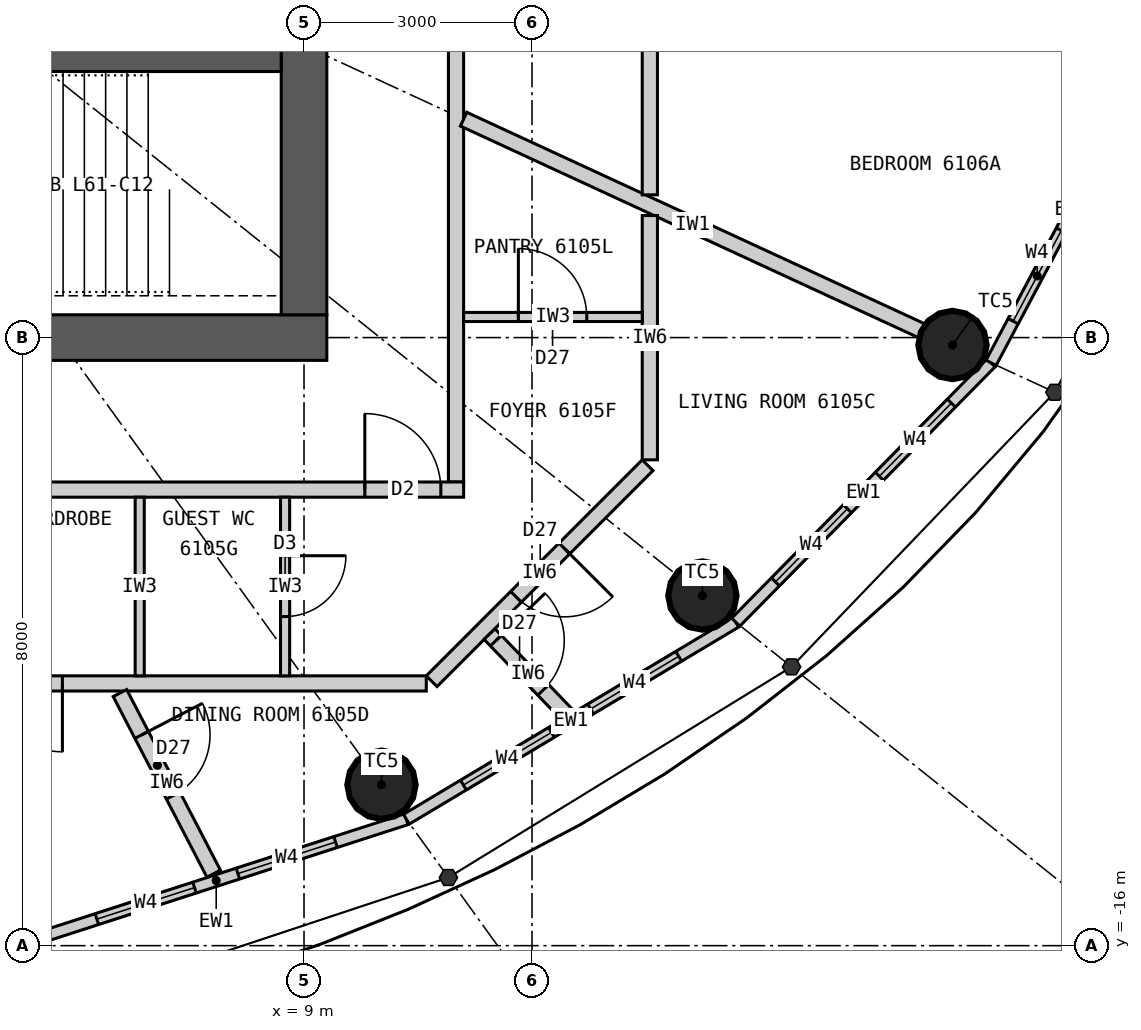
"""IFC4 building model, lengths in metres.
Left out: names, types, materials, properties, quantities, classifications, styles, units other than length and angle.
Written with IfcOpenShell. Run it as: python <this file> out.ifc"""

import sys

from ifc_helpers import new_model, si_unit, direction, frame, frame_2d, origin, origin_2d, place, context, subcontext, project, spatial, rectangle, circle, extrude, element, fill, save


model = new_model("IFC4")
c1 = context("Model", 3, precision=1e-05, world=origin(), true_north=direction((0.0, 1.0)))
c2 = subcontext(c1, "Body", "Model", "MODEL_VIEW")
j1 = project(units=[si_unit("LENGTHUNIT", "METRE"), si_unit("PLANEANGLEUNIT", "RADIAN")], contexts=[c1])
p1 = place(None, origin())
s1 = spatial("IfcSite", under=j1, at=p1, CompositionType="ELEMENT")
p2 = place(p1, origin())
s2 = spatial("IfcBuilding", under=s1, at=p2, CompositionType="ELEMENT")
p3 = place(p2, frame((0.0, 0.0, 225.9)))
s3 = spatial("IfcBuildingStorey", under=s2, at=p3, CompositionType="ELEMENT", Elevation=225.9)
for number, where, z_axis, x_axis in (
    (1, (10.019, -13.883, 0.0), (0.0, 0.0, 1.0), (1.0, 0.0, 0.0)),
    (2, (14.241, -11.393, 0.0), (0.0, 0.0, 1.0), (1.0, 0.0, 0.0)),
    (3, (17.532, -8.098, 0.0), (0.0, 0.0, 1.0), (1.0, 0.0, 0.0)),
):
    element("IfcColumn", number, at=place(p3, frame(where, z_axis=z_axis, x_axis=x_axis)), inside=s3, PredefinedType="COLUMN", context=c2, shape_type="SweptSolid", body=[
        extrude(circle(Radius=0.45, at=origin_2d()), origin(), (0.0, 0.0, 1.0), 3.3),
    ])
p4 = place(p3, frame((9.3, -8.0, 0.0), z_axis=(0.0, 0.0, 1.0), x_axis=(-1.0, 0.0, 0.0)))
e4 = element("IfcWall", 4, at=p4, inside=s3, PredefinedType="SHEAR", context=c2, shape_type="SweptSolid", body=[
    extrude(rectangle(XDim=18.6, YDim=0.6, at=frame_2d((9.3, 0.0))), origin(), (0.0, 0.0, 1.0), 3.3),
])
p5 = place(p4, frame((8.0, 0.0, 0.0)))
e5 = element("IfcOpeningElement", 5, at=p5, cuts=e4, PredefinedType="OPENING", context=c2, shape_type="SweptSolid", body=[
    extrude(rectangle(XDim=1.2, YDim=2.2, at=frame_2d((0.6, 1.1))), frame((0.0, 0.31, 0.0), z_axis=(0.0, -1.0, 0.0), x_axis=(1.0, 0.0, 0.0)), (0.0, 0.0, 1.0), 0.62),
])
p6 = place(p4, frame((15.6, 0.0, 0.0)))
e6 = element("IfcOpeningElement", 6, at=p6, cuts=e4, PredefinedType="OPENING", context=c2, shape_type="SweptSolid", body=[
    extrude(rectangle(XDim=0.9, YDim=2.2, at=frame_2d((0.45, 1.1))), frame((0.0, 0.31, 0.0), z_axis=(0.0, -1.0, 0.0), x_axis=(1.0, 0.0, 0.0)), (0.0, 0.0, 1.0), 0.62),
])
p7 = place(p3, frame((9.0, -7.7, 0.0), z_axis=(0.0, 0.0, 1.0), x_axis=(0.0, 1.0, 0.0)))
e7 = element("IfcWall", 7, at=p7, inside=s3, PredefinedType="SHEAR", context=c2, shape_type="SweptSolid", body=[
    extrude(rectangle(XDim=15.4, YDim=0.6, at=frame_2d((7.7, 0.0))), origin(), (0.0, 0.0, 1.0), 3.3),
])
p8 = place(p7, frame((6.8, 0.0, 0.0)))
e8 = element("IfcOpeningElement", 8, at=p8, cuts=e7, PredefinedType="OPENING", context=c2, shape_type="SweptSolid", body=[
    extrude(rectangle(XDim=1.8, YDim=2.2, at=frame_2d((0.9, 1.1))), frame((0.0, 0.31, 0.0), z_axis=(0.0, -1.0, 0.0), x_axis=(1.0, 0.0, 0.0)), (0.0, 0.0, 1.0), 0.62),
])
p9 = place(p3, frame((-8.7, -4.3, 0.0), z_axis=(0.0, 0.0, 1.0), x_axis=(1.0, 0.0, 0.0)))
e9 = element("IfcWall", 9, at=p9, inside=s3, PredefinedType="SHEAR", context=c2, shape_type="SweptSolid", body=[
    extrude(rectangle(XDim=17.4, YDim=0.4, at=frame_2d((8.7, 0.0))), origin(), (0.0, 0.0, 1.0), 3.3),
])
p10 = place(p3, frame((5.343, -15.952, 0.0), z_axis=(0.0, 0.0, 1.0), x_axis=(0.951644702515, 0.307200846638, 0.0)))
e10 = element("IfcWall", 10, at=p10, inside=s3, PredefinedType="ELEMENTEDWALL", context=c2, shape_type="SweptSolid", body=[
    extrude(rectangle(XDim=5.258, YDim=0.15, at=frame_2d((2.629, 0.0))), origin(), (0.0, 0.0, 1.0), 3.12),
])
p11 = place(p10, frame((0.979, 0.0, 0.9)))
e11 = element("IfcOpeningElement", 11, at=p11, cuts=e10, PredefinedType="OPENING", context=c2, shape_type="SweptSolid", body=[
    extrude(rectangle(XDim=1.35, YDim=1.9, at=frame_2d((0.675, 0.95))), frame((0.0, 0.085, 0.0), z_axis=(0.0, -1.0, 0.0), x_axis=(1.0, 0.0, 0.0)), (0.0, 0.0, 1.0), 0.17),
])
p12 = place(p10, frame((2.929, 0.0, 0.9)))
e12 = element("IfcOpeningElement", 12, at=p12, cuts=e10, PredefinedType="OPENING", context=c2, shape_type="SweptSolid", body=[
    extrude(rectangle(XDim=1.35, YDim=1.9, at=frame_2d((0.675, 0.95))), frame((0.0, 0.085, 0.0), z_axis=(0.0, -1.0, 0.0), x_axis=(1.0, 0.0, 0.0)), (0.0, 0.0, 1.0), 0.17),
])
p13 = place(p3, frame((10.346, -14.336, 0.0), z_axis=(0.0, 0.0, 1.0), x_axis=(0.85822150553, 0.513279502265, 0.0)))
e13 = element("IfcWall", 13, at=p13, inside=s3, PredefinedType="ELEMENTEDWALL", context=c2, shape_type="SweptSolid", body=[
    extrude(rectangle(XDim=5.05, YDim=0.15, at=frame_2d((2.525, 0.0))), origin(), (0.0, 0.0, 1.0), 3.12),
])
p14 = place(p13, frame((0.875, 0.0, 0.9)))
e14 = element("IfcOpeningElement", 14, at=p14, cuts=e13, PredefinedType="OPENING", context=c2, shape_type="SweptSolid", body=[
    extrude(rectangle(XDim=1.35, YDim=1.9, at=frame_2d((0.675, 0.95))), frame((0.0, 0.085, 0.0), z_axis=(0.0, -1.0, 0.0), x_axis=(1.0, 0.0, 0.0)), (0.0, 0.0, 1.0), 0.17),
])
p15 = place(p13, frame((2.825, 0.0, 0.9)))
e15 = element("IfcOpeningElement", 15, at=p15, cuts=e13, PredefinedType="OPENING", context=c2, shape_type="SweptSolid", body=[
    extrude(rectangle(XDim=1.35, YDim=1.9, at=frame_2d((0.675, 0.95))), frame((0.0, 0.085, 0.0), z_axis=(0.0, -1.0, 0.0), x_axis=(1.0, 0.0, 0.0)), (0.0, 0.0, 1.0), 0.17),
])
p16 = place(p3, frame((14.68, -11.744, 0.0), z_axis=(0.0, 0.0, 1.0), x_axis=(0.701527379618, 0.712642501993, 0.0)))
e16 = element("IfcWall", 16, at=p16, inside=s3, PredefinedType="ELEMENTEDWALL", context=c2, shape_type="SweptSolid", body=[
    extrude(rectangle(XDim=4.788, YDim=0.15, at=frame_2d((2.394, 0.0))), origin(), (0.0, 0.0, 1.0), 3.12),
])
p17 = place(p16, frame((0.744, 0.0, 0.9)))
e17 = element("IfcOpeningElement", 17, at=p17, cuts=e16, PredefinedType="OPENING", context=c2, shape_type="SweptSolid", body=[
    extrude(rectangle(XDim=1.35, YDim=1.9, at=frame_2d((0.675, 0.95))), frame((0.0, 0.085, 0.0), z_axis=(0.0, -1.0, 0.0), x_axis=(1.0, 0.0, 0.0)), (0.0, 0.0, 1.0), 0.17),
])
p18 = place(p16, frame((2.694, 0.0, 0.9)))
e18 = element("IfcOpeningElement", 18, at=p18, cuts=e16, PredefinedType="OPENING", context=c2, shape_type="SweptSolid", body=[
    extrude(rectangle(XDim=1.35, YDim=1.9, at=frame_2d((0.675, 0.95))), frame((0.0, 0.085, 0.0), z_axis=(0.0, -1.0, 0.0), x_axis=(1.0, 0.0, 0.0)), (0.0, 0.0, 1.0), 0.17),
])
p19 = place(p3, frame((18.04, -8.332, 0.0), z_axis=(0.0, 0.0, 1.0), x_axis=(0.469256152955, 0.883062094597, 0.0)))
e19 = element("IfcWall", 19, at=p19, inside=s3, PredefinedType="ELEMENTEDWALL", context=c2, shape_type="SweptSolid", body=[
    extrude(rectangle(XDim=4.539, YDim=0.15, at=frame_2d((2.27, 0.0))), origin(), (0.0, 0.0, 1.0), 3.12),
])
p20 = place(p19, frame((0.62, 0.0, 0.9)))
e20 = element("IfcOpeningElement", 20, at=p20, cuts=e19, PredefinedType="OPENING", context=c2, shape_type="SweptSolid", body=[
    extrude(rectangle(XDim=1.35, YDim=1.9, at=frame_2d((0.675, 0.95))), frame((0.0, 0.085, 0.0), z_axis=(0.0, -1.0, 0.0), x_axis=(1.0, 0.0, 0.0)), (0.0, 0.0, 1.0), 0.17),
])
p21 = place(p19, frame((2.57, 0.0, 0.9)))
e21 = element("IfcOpeningElement", 21, at=p21, cuts=e19, PredefinedType="OPENING", context=c2, shape_type="SweptSolid", body=[
    extrude(rectangle(XDim=1.35, YDim=1.9, at=frame_2d((0.675, 0.95))), frame((0.0, 0.085, 0.0), z_axis=(0.0, -1.0, 0.0), x_axis=(1.0, 0.0, 0.0)), (0.0, 0.0, 1.0), 0.17),
])
p22 = place(p3, frame((11.0, -9.9, 0.0), z_axis=(0.0, 0.0, 1.0), x_axis=(0.0, 1.0, 0.0)))
e22 = element("IfcWall", 22, at=p22, inside=s3, PredefinedType="PARTITIONING", context=c2, shape_type="SweptSolid", body=[
    extrude(rectangle(XDim=19.8, YDim=0.2, at=frame_2d((9.9, 0.0))), origin(), (0.0, 0.0, 1.0), 3.12),
])
p23 = place(p22, frame((18.658, 0.0, 0.0)))
e23 = element("IfcOpeningElement", 23, at=p23, cuts=e22, PredefinedType="OPENING", context=c2, shape_type="SweptSolid", body=[
    extrude(rectangle(XDim=1.0, YDim=2.2, at=frame_2d((0.5, 1.1))), frame((0.0, 0.11, 0.0), z_axis=(0.0, -1.0, 0.0), x_axis=(1.0, 0.0, 0.0)), (0.0, 0.0, 1.0), 0.22),
])
p24 = place(p22, frame((9.385, 0.0, 0.0)))
e24 = element("IfcOpeningElement", 24, at=p24, cuts=e22, PredefinedType="OPENING", context=c2, shape_type="SweptSolid", body=[
    extrude(rectangle(XDim=1.0, YDim=2.2, at=frame_2d((0.5, 1.1))), frame((0.0, 0.11, 0.0), z_axis=(0.0, -1.0, 0.0), x_axis=(1.0, 0.0, 0.0)), (0.0, 0.0, 1.0), 0.22),
])
p25 = place(p3, frame((11.1, -10.0, 0.0), z_axis=(0.0, 0.0, 1.0), x_axis=(-1.0, 0.0, 0.0)))
e25 = element("IfcWall", 25, at=p25, inside=s3, PredefinedType="PARTITIONING", context=c2, shape_type="SweptSolid", body=[
    extrude(rectangle(XDim=22.2, YDim=0.2, at=frame_2d((11.1, 0.0))), origin(), (0.0, 0.0, 1.0), 3.12),
])
p26 = place(p25, frame((0.3, 0.0, 0.0)))
e26 = element("IfcOpeningElement", 26, at=p26, cuts=e25, PredefinedType="OPENING", context=c2, shape_type="SweptSolid", body=[
    extrude(rectangle(XDim=1.0, YDim=2.2, at=frame_2d((0.5, 1.1))), frame((0.0, 0.11, 0.0), z_axis=(0.0, -1.0, 0.0), x_axis=(1.0, 0.0, 0.0)), (0.0, 0.0, 1.0), 0.22),
])
p27 = place(p3, frame((11.1, -5.127, 0.0), z_axis=(0.0, 0.0, 1.0), x_axis=(0.907840886552, -0.419314827672, 0.0)))
e27 = element("IfcWall", 27, at=p27, inside=s3, PredefinedType="PARTITIONING", context=c2, shape_type="SweptSolid", body=[
    extrude(rectangle(XDim=6.635, YDim=0.2, at=frame_2d((3.318, 0.0))), origin(), (0.0, 0.0, 1.0), 2.32),
])
p28 = place(p3, frame((0.101, -12.55, 0.0), z_axis=(0.0, 0.0, 1.0), x_axis=(1.0, 0.0, 0.0)))
e28 = element("IfcWall", 28, at=p28, inside=s3, PredefinedType="PARTITIONING", context=c2, shape_type="SweptSolid", body=[
    extrude(rectangle(XDim=10.508, YDim=0.2, at=frame_2d((5.254, 0.0))), origin(), (0.0, 0.0, 1.0), 3.12),
])
p29 = place(p28, frame((2.675, 0.0, 0.0)))
e29 = element("IfcOpeningElement", 29, at=p29, cuts=e28, PredefinedType="OPENING", context=c2, shape_type="SweptSolid", body=[
    extrude(rectangle(XDim=0.8, YDim=2.1, at=frame_2d((0.4, 1.05))), frame((0.0, 0.11, 0.0), z_axis=(0.0, -1.0, 0.0), x_axis=(1.0, 0.0, 0.0)), (0.0, 0.0, 1.0), 0.22),
])
p30 = place(p28, frame((4.82, 0.0, 0.0)))
e30 = element("IfcOpeningElement", 30, at=p30, cuts=e28, PredefinedType="OPENING", context=c2, shape_type="SweptSolid", body=[
    extrude(rectangle(XDim=0.9, YDim=2.1, at=frame_2d((0.45, 1.05))), frame((0.0, 0.11, 0.0), z_axis=(0.0, -1.0, 0.0), x_axis=(1.0, 0.0, 0.0)), (0.0, 0.0, 1.0), 0.22),
])
p31 = place(p3, frame((10.679, -12.521, 0.0), z_axis=(0.0, 0.0, 1.0), x_axis=(0.707106781187, 0.707106781187, 0.0)))
e31 = element("IfcWall", 31, at=p31, inside=s3, PredefinedType="PARTITIONING", context=c2, shape_type="SweptSolid", body=[
    extrude(rectangle(XDim=4.019, YDim=0.2, at=frame_2d((2.009, 0.0))), origin(), (0.0, 0.0, 1.0), 3.12),
])
p32 = place(p31, frame((1.57, 0.0, 0.0)))
e32 = element("IfcOpeningElement", 32, at=p32, cuts=e31, PredefinedType="OPENING", context=c2, shape_type="SweptSolid", body=[
    extrude(rectangle(XDim=0.9, YDim=2.1, at=frame_2d((0.45, 1.05))), frame((0.0, 0.11, 0.0), z_axis=(0.0, -1.0, 0.0), x_axis=(1.0, 0.0, 0.0)), (0.0, 0.0, 1.0), 0.22),
])
p33 = place(p3, frame((13.55, -9.609, 0.0), z_axis=(0.0, 0.0, 1.0), x_axis=(0.0, 1.0, 0.0)))
e33 = element("IfcWall", 33, at=p33, inside=s3, PredefinedType="PARTITIONING", context=c2, shape_type="SweptSolid", body=[
    extrude(rectangle(XDim=3.214, YDim=0.2, at=frame_2d((1.607, 0.0))), origin(), (0.0, 0.0, 1.0), 3.12),
])
p34 = place(p3, frame((6.578, -12.677, 0.0), z_axis=(0.0, 0.0, 1.0), x_axis=(0.460620531465, -0.887597164255, 0.0)))
e34 = element("IfcWall", 34, at=p34, inside=s3, PredefinedType="PARTITIONING", context=c2, shape_type="SweptSolid", body=[
    extrude(rectangle(XDim=2.678, YDim=0.2, at=frame_2d((1.339, 0.0))), origin(), (0.0, 0.0, 1.0), 3.12),
])
p35 = place(p34, frame((0.62, 0.0, 0.0)))
e35 = element("IfcOpeningElement", 35, at=p35, cuts=e34, PredefinedType="OPENING", context=c2, shape_type="SweptSolid", body=[
    extrude(rectangle(XDim=0.9, YDim=2.1, at=frame_2d((0.45, 1.05))), frame((0.0, 0.11, 0.0), z_axis=(0.0, -1.0, 0.0), x_axis=(1.0, 0.0, 0.0)), (0.0, 0.0, 1.0), 0.22),
])
p36 = place(p3, frame((11.441, -11.9, 0.0), z_axis=(0.0, 0.0, 1.0), x_axis=(0.692958717259, -0.720977264672, 0.0)))
e36 = element("IfcWall", 36, at=p36, inside=s3, PredefinedType="PARTITIONING", context=c2, shape_type="SweptSolid", body=[
    extrude(rectangle(XDim=1.464, YDim=0.2, at=frame_2d((0.732, 0.0))), origin(), (0.0, 0.0, 1.0), 3.12),
])
p37 = place(p36, frame((0.12, 0.0, 0.0)))
e37 = element("IfcOpeningElement", 37, at=p37, cuts=e36, PredefinedType="OPENING", context=c2, shape_type="SweptSolid", body=[
    extrude(rectangle(XDim=0.9, YDim=2.1, at=frame_2d((0.45, 1.05))), frame((0.0, 0.11, 0.0), z_axis=(0.0, -1.0, 0.0), x_axis=(1.0, 0.0, 0.0)), (0.0, 0.0, 1.0), 0.22),
])
p38 = place(p3, frame((6.838, -10.1, 0.0), z_axis=(0.0, 0.0, 1.0), x_axis=(0.0, -1.0, 0.0)))
e38 = element("IfcWall", 38, at=p38, inside=s3, PredefinedType="PARTITIONING", context=c2, shape_type="SweptSolid", body=[
    extrude(rectangle(XDim=2.35, YDim=0.12, at=frame_2d((1.175, 0.0))), origin(), (0.0, 0.0, 1.0), 3.12),
])
p39 = place(p3, frame((8.751, -10.1, 0.0), z_axis=(0.0, 0.0, 1.0), x_axis=(0.0, -1.0, 0.0)))
e39 = element("IfcWall", 39, at=p39, inside=s3, PredefinedType="PARTITIONING", context=c2, shape_type="SweptSolid", body=[
    extrude(rectangle(XDim=2.35, YDim=0.12, at=frame_2d((1.175, 0.0))), origin(), (0.0, 0.0, 1.0), 3.12),
])
p40 = place(p39, frame((0.77, 0.0, 0.0)))
e40 = element("IfcOpeningElement", 40, at=p40, cuts=e39, PredefinedType="OPENING", context=c2, shape_type="SweptSolid", body=[
    extrude(rectangle(XDim=0.8, YDim=2.1, at=frame_2d((0.4, 1.05))), frame((0.0, 0.07, 0.0), z_axis=(0.0, -1.0, 0.0), x_axis=(1.0, 0.0, 0.0)), (0.0, 0.0, 1.0), 0.14),
])
p41 = place(p3, frame((11.1, -7.729, 0.0), z_axis=(0.0, 0.0, 1.0), x_axis=(1.0, 0.0, 0.0)))
e41 = element("IfcWall", 41, at=p41, inside=s3, PredefinedType="PARTITIONING", context=c2, shape_type="SweptSolid", body=[
    extrude(rectangle(XDim=2.35, YDim=0.12, at=frame_2d((1.175, 0.0))), origin(), (0.0, 0.0, 1.0), 3.12),
])
p42 = place(p41, frame((0.72, 0.0, 0.0)))
e42 = element("IfcOpeningElement", 42, at=p42, cuts=e41, PredefinedType="OPENING", context=c2, shape_type="SweptSolid", body=[
    extrude(rectangle(XDim=0.9, YDim=2.1, at=frame_2d((0.45, 1.05))), frame((0.0, 0.07, 0.0), z_axis=(0.0, -1.0, 0.0), x_axis=(1.0, 0.0, 0.0)), (0.0, 0.0, 1.0), 0.14),
])
p43 = place(p3, frame((13.55, -6.122, 0.0), z_axis=(0.0, 0.0, 1.0), x_axis=(0.0, 1.0, 0.0)))
e43 = element("IfcWall", 43, at=p43, inside=s3, PredefinedType="PARTITIONING", context=c2, shape_type="SweptSolid", body=[
    extrude(rectangle(XDim=12.245, YDim=0.2, at=frame_2d((6.122, 0.0))), origin(), (0.0, 0.0, 1.0), 3.12),
])
p44 = place(p43, frame((2.07, 0.0, 0.0)))
e44 = element("IfcOpeningElement", 44, at=p44, cuts=e43, PredefinedType="OPENING", context=c2, shape_type="SweptSolid", body=[
    extrude(rectangle(XDim=0.8, YDim=2.1, at=frame_2d((0.4, 1.05))), frame((0.0, 0.11, 0.0), z_axis=(0.0, -1.0, 0.0), x_axis=(1.0, 0.0, 0.0)), (0.0, 0.0, 1.0), 0.22),
])
p45 = place(p43, frame((9.37, 0.0, 0.0)))
e45 = element("IfcOpeningElement", 45, at=p45, cuts=e43, PredefinedType="OPENING", context=c2, shape_type="SweptSolid", body=[
    extrude(rectangle(XDim=0.8, YDim=2.1, at=frame_2d((0.4, 1.05))), frame((0.0, 0.11, 0.0), z_axis=(0.0, -1.0, 0.0), x_axis=(1.0, 0.0, 0.0)), (0.0, 0.0, 1.0), 0.22),
])
p46 = place(p43, frame((5.67, 0.0, 0.0)))
e46 = element("IfcOpeningElement", 46, at=p46, cuts=e43, PredefinedType="OPENING", context=c2, shape_type="SweptSolid", body=[
    extrude(rectangle(XDim=0.9, YDim=2.1, at=frame_2d((0.45, 1.05))), frame((0.0, 0.11, 0.0), z_axis=(0.0, -1.0, 0.0), x_axis=(1.0, 0.0, 0.0)), (0.0, 0.0, 1.0), 0.22),
])
p47 = place(p11, origin())
e47 = element("IfcWindow", 47, at=p47, inside=s3, PartitioningType="SINGLE_PANEL", PredefinedType="WINDOW", context=c2, shape_type="SweptSolid", body=[
    extrude(rectangle(XDim=1.35, YDim=1.9, at=frame_2d((0.675, 0.95))), frame((0.0, 0.03, 0.0), z_axis=(0.0, -1.0, 0.0), x_axis=(1.0, 0.0, 0.0)), (0.0, 0.0, 1.0), 0.06),
])
fill(e11, e47)
p48 = place(p12, origin())
e48 = element("IfcWindow", 48, at=p48, inside=s3, PartitioningType="SINGLE_PANEL", PredefinedType="WINDOW", context=c2, shape_type="SweptSolid", body=[
    extrude(rectangle(XDim=1.35, YDim=1.9, at=frame_2d((0.675, 0.95))), frame((0.0, 0.03, 0.0), z_axis=(0.0, -1.0, 0.0), x_axis=(1.0, 0.0, 0.0)), (0.0, 0.0, 1.0), 0.06),
])
fill(e12, e48)
p49 = place(p14, origin())
e49 = element("IfcWindow", 49, at=p49, inside=s3, PartitioningType="SINGLE_PANEL", PredefinedType="WINDOW", context=c2, shape_type="SweptSolid", body=[
    extrude(rectangle(XDim=1.35, YDim=1.9, at=frame_2d((0.675, 0.95))), frame((0.0, 0.03, 0.0), z_axis=(0.0, -1.0, 0.0), x_axis=(1.0, 0.0, 0.0)), (0.0, 0.0, 1.0), 0.06),
])
fill(e14, e49)
p50 = place(p15, origin())
e50 = element("IfcWindow", 50, at=p50, inside=s3, PartitioningType="SINGLE_PANEL", PredefinedType="WINDOW", context=c2, shape_type="SweptSolid", body=[
    extrude(rectangle(XDim=1.35, YDim=1.9, at=frame_2d((0.675, 0.95))), frame((0.0, 0.03, 0.0), z_axis=(0.0, -1.0, 0.0), x_axis=(1.0, 0.0, 0.0)), (0.0, 0.0, 1.0), 0.06),
])
fill(e15, e50)
p51 = place(p17, origin())
e51 = element("IfcWindow", 51, at=p51, inside=s3, PartitioningType="SINGLE_PANEL", PredefinedType="WINDOW", context=c2, shape_type="SweptSolid", body=[
    extrude(rectangle(XDim=1.35, YDim=1.9, at=frame_2d((0.675, 0.95))), frame((0.0, 0.03, 0.0), z_axis=(0.0, -1.0, 0.0), x_axis=(1.0, 0.0, 0.0)), (0.0, 0.0, 1.0), 0.06),
])
fill(e17, e51)
p52 = place(p18, origin())
e52 = element("IfcWindow", 52, at=p52, inside=s3, PartitioningType="SINGLE_PANEL", PredefinedType="WINDOW", context=c2, shape_type="SweptSolid", body=[
    extrude(rectangle(XDim=1.35, YDim=1.9, at=frame_2d((0.675, 0.95))), frame((0.0, 0.03, 0.0), z_axis=(0.0, -1.0, 0.0), x_axis=(1.0, 0.0, 0.0)), (0.0, 0.0, 1.0), 0.06),
])
fill(e18, e52)
p53 = place(p20, origin())
e53 = element("IfcWindow", 53, at=p53, inside=s3, PartitioningType="SINGLE_PANEL", PredefinedType="WINDOW", context=c2, shape_type="SweptSolid", body=[
    extrude(rectangle(XDim=1.35, YDim=1.9, at=frame_2d((0.675, 0.95))), frame((0.0, 0.03, 0.0), z_axis=(0.0, -1.0, 0.0), x_axis=(1.0, 0.0, 0.0)), (0.0, 0.0, 1.0), 0.06),
])
fill(e20, e53)
p54 = place(p26, origin())
e54 = element("IfcDoor", 54, at=p54, inside=s3, OperationType="SINGLE_SWING_RIGHT", PredefinedType="DOOR", context=c2, shape_type="SweptSolid", body=[
    extrude(rectangle(XDim=1.0, YDim=2.2, at=frame_2d((0.5, 1.1))), frame((0.0, 0.025, 0.0), z_axis=(0.0, -1.0, 0.0), x_axis=(1.0, 0.0, 0.0)), (0.0, 0.0, 1.0), 0.05),
])
fill(e26, e54)
p55 = place(p30, origin())
e55 = element("IfcDoor", 55, at=p55, inside=s3, OperationType="SINGLE_SWING_RIGHT", PredefinedType="DOOR", context=c2, shape_type="SweptSolid", body=[
    extrude(rectangle(XDim=0.9, YDim=2.1, at=frame_2d((0.45, 1.05))), frame((0.0, 0.025, 0.0), z_axis=(0.0, -1.0, 0.0), x_axis=(1.0, 0.0, 0.0)), (0.0, 0.0, 1.0), 0.05),
])
fill(e30, e55)
p56 = place(p40, origin())
e56 = element("IfcDoor", 56, at=p56, inside=s3, OperationType="SINGLE_SWING_LEFT", PredefinedType="DOOR", context=c2, shape_type="SweptSolid", body=[
    extrude(rectangle(XDim=0.8, YDim=2.1, at=frame_2d((0.4, 1.05))), frame((0.0, 0.025, 0.0), z_axis=(0.0, -1.0, 0.0), x_axis=(1.0, 0.0, 0.0)), (0.0, 0.0, 1.0), 0.05),
])
fill(e40, e56)
p57 = place(p42, origin())
e57 = element("IfcDoor", 57, at=p57, inside=s3, OperationType="SINGLE_SWING_LEFT", PredefinedType="DOOR", context=c2, shape_type="SweptSolid", body=[
    extrude(rectangle(XDim=0.9, YDim=2.1, at=frame_2d((0.45, 1.05))), frame((0.0, 0.025, 0.0), z_axis=(0.0, -1.0, 0.0), x_axis=(1.0, 0.0, 0.0)), (0.0, 0.0, 1.0), 0.05),
])
fill(e42, e57)
p58 = place(p32, origin())
e58 = element("IfcDoor", 58, at=p58, inside=s3, OperationType="SINGLE_SWING_RIGHT", PredefinedType="DOOR", context=c2, shape_type="SweptSolid", body=[
    extrude(rectangle(XDim=0.9, YDim=2.1, at=frame_2d((0.45, 1.05))), frame((0.0, 0.025, 0.0), z_axis=(0.0, -1.0, 0.0), x_axis=(1.0, 0.0, 0.0)), (0.0, 0.0, 1.0), 0.05),
])
fill(e32, e58)
p59 = place(p35, origin())
e59 = element("IfcDoor", 59, at=p59, inside=s3, OperationType="SINGLE_SWING_LEFT", PredefinedType="DOOR", context=c2, shape_type="SweptSolid", body=[
    extrude(rectangle(XDim=0.9, YDim=2.1, at=frame_2d((0.45, 1.05))), frame((0.0, 0.025, 0.0), z_axis=(0.0, -1.0, 0.0), x_axis=(1.0, 0.0, 0.0)), (0.0, 0.0, 1.0), 0.05),
])
fill(e35, e59)
p60 = place(p37, origin())
e60 = element("IfcDoor", 60, at=p60, inside=s3, OperationType="SINGLE_SWING_LEFT", PredefinedType="DOOR", context=c2, shape_type="SweptSolid", body=[
    extrude(rectangle(XDim=0.9, YDim=2.1, at=frame_2d((0.45, 1.05))), frame((0.0, 0.025, 0.0), z_axis=(0.0, -1.0, 0.0), x_axis=(1.0, 0.0, 0.0)), (0.0, 0.0, 1.0), 0.05),
])
fill(e37, e60)
save(model, sys.argv[1])
